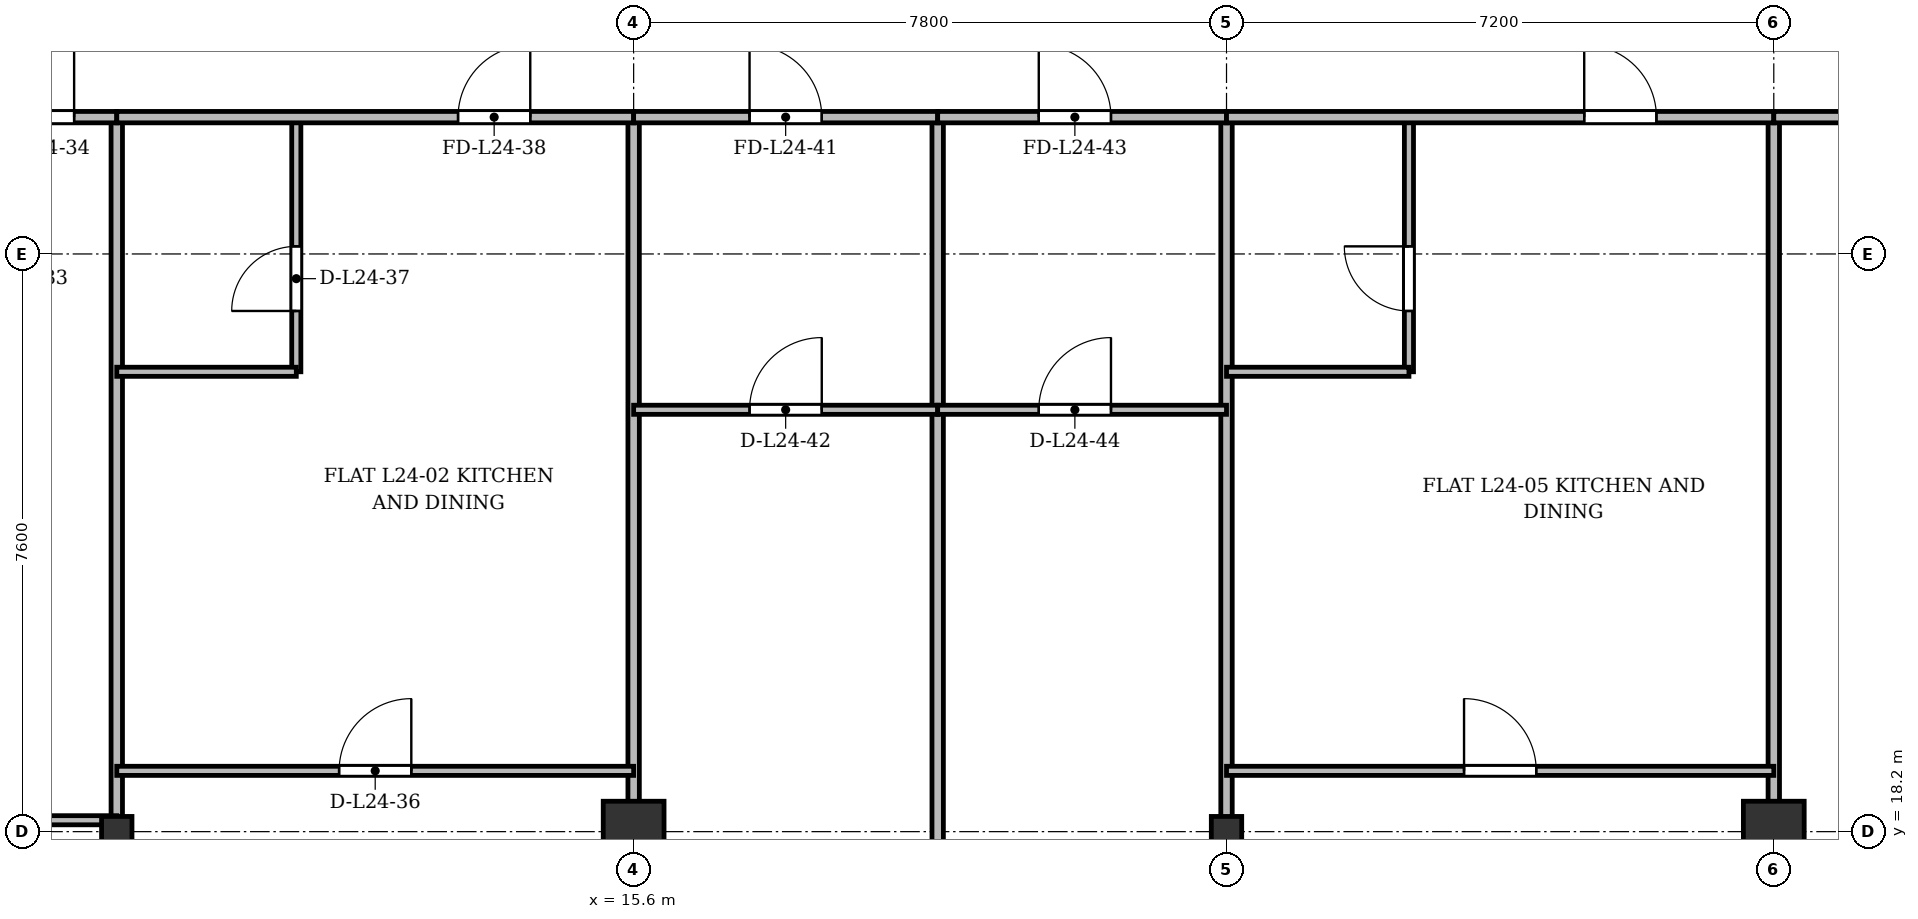
"""IFC4 building model, lengths in metres.
Left out: names, types, materials, properties, quantities, classifications, styles, units other than length and angle.
Written with IfcOpenShell. Run it as: python <this file> out.ifc"""

import sys

from ifc_helpers import new_model, si_unit, direction, frame, frame_2d, origin, origin_2d, place, context, subcontext, project, spatial, rectangle, i_section, extrude, source, transform, mapped, element, fill, save


model = new_model("IFC4")
c1 = context("Model", 3, precision=1e-05, world=origin(), true_north=direction((0.0, 1.0)))
c2 = subcontext(c1, "Body", "Model", "MODEL_VIEW")
j1 = project(units=[si_unit("LENGTHUNIT", "METRE"), si_unit("PLANEANGLEUNIT", "RADIAN")], contexts=[c1])
p1 = place(None, origin())
s1 = spatial("IfcSite", under=j1, at=p1, CompositionType="ELEMENT")
p2 = place(p1, origin())
s2 = spatial("IfcBuilding", under=s1, at=p2, CompositionType="ELEMENT")
p3 = place(p2, frame((0.0, 0.0, 96.1)))
s3 = spatial("IfcBuildingStorey", under=s2, at=p3, CompositionType="ELEMENT", Elevation=96.1)
m1 = source(origin(), c2, "Body", "SweptSolid", [
    extrude(i_section(OverallWidth=0.4, OverallDepth=0.4, WebThickness=0.022, FlangeThickness=0.035, at=origin_2d()), origin(), (0.0, 0.0, 1.0), 3.6),
])
p4 = place(p3, frame((8.8, 18.2, 0.0), z_axis=(0.0, 0.0, 1.0), x_axis=(1.0, 0.0, 0.0)))
e1 = element("IfcColumn", 1, at=p4, inside=s3, PredefinedType="COLUMN", context=c2, shape_type="MappedRepresentation", body=[
    mapped(m1, transform((0.0, 0.0, 0.0), x_axis=(1.0, 0.0, 0.0), y_axis=(0.0, 1.0, 0.0), z_axis=(0.0, 0.0, 1.0), scale=1.0)),
])
m2 = source(origin(), c2, "Body", "SweptSolid", [
    extrude(rectangle(XDim=0.8, YDim=0.8, at=origin_2d()), origin(), (0.0, 0.0, 1.0), 3.6),
])
p5 = place(p3, frame((15.6, 18.2, 0.0), z_axis=(0.0, 0.0, 1.0), x_axis=(1.0, 0.0, 0.0)))
e2 = element("IfcColumn", 2, at=p5, inside=s3, PredefinedType="COLUMN", context=c2, shape_type="MappedRepresentation", body=[
    mapped(m2, transform((0.0, 0.0, 0.0), x_axis=(1.0, 0.0, 0.0), y_axis=(0.0, 1.0, 0.0), z_axis=(0.0, 0.0, 1.0), scale=1.0)),
])
p6 = place(p3, frame((23.4, 18.2, 0.0), z_axis=(0.0, 0.0, 1.0), x_axis=(1.0, 0.0, 0.0)))
e3 = element("IfcColumn", 3, at=p6, inside=s3, PredefinedType="COLUMN", context=c2, shape_type="MappedRepresentation", body=[
    mapped(m1, transform((0.0, 0.0, 0.0), x_axis=(1.0, 0.0, 0.0), y_axis=(0.0, 1.0, 0.0), z_axis=(0.0, 0.0, 1.0), scale=1.0)),
])
p7 = place(p3, frame((30.6, 18.2, 0.0), z_axis=(0.0, 0.0, 1.0), x_axis=(1.0, 0.0, 0.0)))
e4 = element("IfcColumn", 4, at=p7, inside=s3, PredefinedType="COLUMN", context=c2, shape_type="MappedRepresentation", body=[
    mapped(m2, transform((0.0, 0.0, 0.0), x_axis=(1.0, 0.0, 0.0), y_axis=(0.0, 1.0, 0.0), z_axis=(0.0, 0.0, 1.0), scale=1.0)),
])
for number, where, z_axis, x_axis in (
    (5, (8.8, 3.145, 0.0), (0.0, 0.0, 1.0), (0.0, 1.0, 0.0)),
    (6, (15.6, 3.145, 0.0), (0.0, 0.0, 1.0), (0.0, 1.0, 0.0)),
):
    element("IfcWall", number, at=place(p3, frame(where, z_axis=z_axis, x_axis=x_axis)), inside=s3, PredefinedType="PARTITIONING", context=c2, shape_type="SweptSolid", body=[
        extrude(rectangle(XDim=24.455, YDim=0.15, at=frame_2d((12.228, 0.0))), origin(), (0.0, 0.0, 1.0), 2.84),
    ])
p8 = place(p3, frame((19.6, 3.145, 0.0), z_axis=(0.0, 0.0, 1.0), x_axis=(0.0, 1.0, 0.0)))
e7 = element("IfcWall", 7, at=p8, inside=s3, PredefinedType="PARTITIONING", context=c2, shape_type="SweptSolid", body=[
    extrude(rectangle(XDim=24.455, YDim=0.15, at=frame_2d((12.228, 0.0))), origin(), (0.0, 0.0, 1.0), 2.752),
])
for number, where, z_axis, x_axis in (
    (8, (23.4, 3.145, 0.0), (0.0, 0.0, 1.0), (0.0, 1.0, 0.0)),
    (9, (30.6, 3.145, 0.0), (0.0, 0.0, 1.0), (0.0, 1.0, 0.0)),
):
    element("IfcWall", number, at=place(p3, frame(where, z_axis=z_axis, x_axis=x_axis)), inside=s3, PredefinedType="PARTITIONING", context=c2, shape_type="SweptSolid", body=[
        extrude(rectangle(XDim=24.455, YDim=0.15, at=frame_2d((12.228, 0.0))), origin(), (0.0, 0.0, 1.0), 2.84),
    ])
p9 = place(p3, frame((4.76, 18.35, 0.0), z_axis=(0.0, 0.0, 1.0), x_axis=(1.0, 0.0, 0.0)))
e10 = element("IfcWall", 10, at=p9, inside=s3, PredefinedType="PARTITIONING", context=c2, shape_type="SweptSolid", body=[
    extrude(rectangle(XDim=4.04, YDim=0.12, at=frame_2d((2.02, 0.0))), origin(), (0.0, 0.0, 1.0), 2.752),
])
p10 = place(p9, frame((1.545, 0.0, 0.0)))
e11 = element("IfcOpeningElement", 11, at=p10, cuts=e10, PredefinedType="OPENING", context=c2, shape_type="SweptSolid", body=[
    extrude(rectangle(XDim=0.95, YDim=2.15, at=frame_2d((0.475, 1.075))), frame((0.0, 0.07, 0.0), z_axis=(0.0, -1.0, 0.0), x_axis=(1.0, 0.0, 0.0)), (0.0, 0.0, 1.0), 0.14),
])
p11 = place(p3, frame((4.745, 27.6, 0.0), z_axis=(0.0, 0.0, 1.0), x_axis=(1.0, 0.0, 0.0)))
e12 = element("IfcWall", 12, at=p11, inside=s3, PredefinedType="PARTITIONING", context=c2, shape_type="SweptSolid", body=[
    extrude(rectangle(XDim=4.055, YDim=0.15, at=frame_2d((2.027, 0.0))), origin(), (0.0, 0.0, 1.0), 2.84),
])
p12 = place(p11, frame((2.544, 0.0, 0.0)))
e13 = element("IfcOpeningElement", 13, at=p12, cuts=e12, PredefinedType="OPENING", context=c2, shape_type="SweptSolid", body=[
    extrude(rectangle(XDim=0.95, YDim=2.15, at=frame_2d((0.475, 1.075))), frame((0.0, 0.085, 0.0), z_axis=(0.0, -1.0, 0.0), x_axis=(1.0, 0.0, 0.0)), (0.0, 0.0, 1.0), 0.17),
])
p13 = place(p3, frame((8.8, 19.0, 0.0), z_axis=(0.0, 0.0, 1.0), x_axis=(1.0, 0.0, 0.0)))
e14 = element("IfcWall", 14, at=p13, inside=s3, PredefinedType="PARTITIONING", context=c2, shape_type="SweptSolid", body=[
    extrude(rectangle(XDim=6.8, YDim=0.12, at=frame_2d((3.4, 0.0))), origin(), (0.0, 0.0, 1.0), 2.84),
])
p14 = place(p13, frame((2.925, 0.0, 0.0)))
e15 = element("IfcOpeningElement", 15, at=p14, cuts=e14, PredefinedType="OPENING", context=c2, shape_type="SweptSolid", body=[
    extrude(rectangle(XDim=0.95, YDim=2.15, at=frame_2d((0.475, 1.075))), frame((0.0, 0.07, 0.0), z_axis=(0.0, -1.0, 0.0), x_axis=(1.0, 0.0, 0.0)), (0.0, 0.0, 1.0), 0.14),
])
p15 = place(p3, frame((11.162, 24.25, 0.0), z_axis=(0.0, 0.0, 1.0), x_axis=(0.0, 1.0, 0.0)))
e16 = element("IfcWall", 16, at=p15, inside=s3, PredefinedType="PARTITIONING", context=c2, shape_type="SweptSolid", body=[
    extrude(rectangle(XDim=3.35, YDim=0.12, at=frame_2d((1.675, 0.0))), origin(), (0.0, 0.0, 1.0), 2.99),
])
p16 = place(p15, frame((0.8, 0.0, 0.0)))
e17 = element("IfcOpeningElement", 17, at=p16, cuts=e16, PredefinedType="OPENING", context=c2, shape_type="SweptSolid", body=[
    extrude(rectangle(XDim=0.85, YDim=2.1, at=frame_2d((0.425, 1.05))), frame((0.0, 0.07, 0.0), z_axis=(0.0, -1.0, 0.0), x_axis=(1.0, 0.0, 0.0)), (0.0, 0.0, 1.0), 0.14),
])
p17 = place(p3, frame((8.8, 24.25, 0.0), z_axis=(0.0, 0.0, 1.0), x_axis=(1.0, 0.0, 0.0)))
e18 = element("IfcWall", 18, at=p17, inside=s3, PredefinedType="PARTITIONING", context=c2, shape_type="SweptSolid", body=[
    extrude(rectangle(XDim=2.362, YDim=0.12, at=frame_2d((1.181, 0.0))), origin(), (0.0, 0.0, 1.0), 2.84),
])
p18 = place(p3, frame((8.8, 27.6, 0.0), z_axis=(0.0, 0.0, 1.0), x_axis=(1.0, 0.0, 0.0)))
e19 = element("IfcWall", 19, at=p18, inside=s3, PredefinedType="PARTITIONING", context=c2, shape_type="SweptSolid", body=[
    extrude(rectangle(XDim=6.8, YDim=0.15, at=frame_2d((3.4, 0.0))), origin(), (0.0, 0.0, 1.0), 2.84),
])
p19 = place(p18, frame((4.49, 0.0, 0.0)))
e20 = element("IfcOpeningElement", 20, at=p19, cuts=e19, PredefinedType="OPENING", context=c2, shape_type="SweptSolid", body=[
    extrude(rectangle(XDim=0.95, YDim=2.15, at=frame_2d((0.475, 1.075))), frame((0.0, 0.085, 0.0), z_axis=(0.0, -1.0, 0.0), x_axis=(1.0, 0.0, 0.0)), (0.0, 0.0, 1.0), 0.17),
])
p20 = place(p3, frame((15.6, 27.6, 0.0), z_axis=(0.0, 0.0, 1.0), x_axis=(1.0, 0.0, 0.0)))
e21 = element("IfcWall", 21, at=p20, inside=s3, PredefinedType="PARTITIONING", context=c2, shape_type="SweptSolid", body=[
    extrude(rectangle(XDim=4.0, YDim=0.15, at=frame_2d((2.0, 0.0))), origin(), (0.0, 0.0, 1.0), 2.84),
])
p21 = place(p20, frame((1.525, 0.0, 0.0)))
e22 = element("IfcOpeningElement", 22, at=p21, cuts=e21, PredefinedType="OPENING", context=c2, shape_type="SweptSolid", body=[
    extrude(rectangle(XDim=0.95, YDim=2.15, at=frame_2d((0.475, 1.075))), frame((0.0, 0.085, 0.0), z_axis=(0.0, -1.0, 0.0), x_axis=(1.0, 0.0, 0.0)), (0.0, 0.0, 1.0), 0.17),
])
p22 = place(p3, frame((15.6, 23.75, 0.0), z_axis=(0.0, 0.0, 1.0), x_axis=(1.0, 0.0, 0.0)))
e23 = element("IfcWall", 23, at=p22, inside=s3, PredefinedType="PARTITIONING", context=c2, shape_type="SweptSolid", body=[
    extrude(rectangle(XDim=4.0, YDim=0.12, at=frame_2d((2.0, 0.0))), origin(), (0.0, 0.0, 1.0), 2.84),
])
p23 = place(p22, frame((1.525, 0.0, 0.0)))
e24 = element("IfcOpeningElement", 24, at=p23, cuts=e23, PredefinedType="OPENING", context=c2, shape_type="SweptSolid", body=[
    extrude(rectangle(XDim=0.95, YDim=2.15, at=frame_2d((0.475, 1.075))), frame((0.0, 0.07, 0.0), z_axis=(0.0, -1.0, 0.0), x_axis=(1.0, 0.0, 0.0)), (0.0, 0.0, 1.0), 0.14),
])
p24 = place(p3, frame((19.6, 27.6, 0.0), z_axis=(0.0, 0.0, 1.0), x_axis=(1.0, 0.0, 0.0)))
e25 = element("IfcWall", 25, at=p24, inside=s3, PredefinedType="PARTITIONING", context=c2, shape_type="SweptSolid", body=[
    extrude(rectangle(XDim=3.8, YDim=0.15, at=frame_2d((1.9, 0.0))), origin(), (0.0, 0.0, 1.0), 2.84),
])
p25 = place(p24, frame((1.33, 0.0, 0.0)))
e26 = element("IfcOpeningElement", 26, at=p25, cuts=e25, PredefinedType="OPENING", context=c2, shape_type="SweptSolid", body=[
    extrude(rectangle(XDim=0.95, YDim=2.15, at=frame_2d((0.475, 1.075))), frame((0.0, 0.085, 0.0), z_axis=(0.0, -1.0, 0.0), x_axis=(1.0, 0.0, 0.0)), (0.0, 0.0, 1.0), 0.17),
])
p26 = place(p3, frame((19.6, 23.75, 0.0), z_axis=(0.0, 0.0, 1.0), x_axis=(1.0, 0.0, 0.0)))
e27 = element("IfcWall", 27, at=p26, inside=s3, PredefinedType="PARTITIONING", context=c2, shape_type="SweptSolid", body=[
    extrude(rectangle(XDim=3.8, YDim=0.12, at=frame_2d((1.9, 0.0))), origin(), (0.0, 0.0, 1.0), 2.84),
])
p27 = place(p26, frame((1.33, 0.0, 0.0)))
e28 = element("IfcOpeningElement", 28, at=p27, cuts=e27, PredefinedType="OPENING", context=c2, shape_type="SweptSolid", body=[
    extrude(rectangle(XDim=0.95, YDim=2.15, at=frame_2d((0.475, 1.075))), frame((0.0, 0.07, 0.0), z_axis=(0.0, -1.0, 0.0), x_axis=(1.0, 0.0, 0.0)), (0.0, 0.0, 1.0), 0.14),
])
p28 = place(p3, frame((23.4, 19.0, 0.0), z_axis=(0.0, 0.0, 1.0), x_axis=(1.0, 0.0, 0.0)))
e29 = element("IfcWall", 29, at=p28, inside=s3, PredefinedType="PARTITIONING", context=c2, shape_type="SweptSolid", body=[
    extrude(rectangle(XDim=7.2, YDim=0.12, at=frame_2d((3.6, 0.0))), origin(), (0.0, 0.0, 1.0), 2.84),
])
p29 = place(p28, frame((3.125, 0.0, 0.0)))
e30 = element("IfcOpeningElement", 30, at=p29, cuts=e29, PredefinedType="OPENING", context=c2, shape_type="SweptSolid", body=[
    extrude(rectangle(XDim=0.95, YDim=2.15, at=frame_2d((0.475, 1.075))), frame((0.0, 0.07, 0.0), z_axis=(0.0, -1.0, 0.0), x_axis=(1.0, 0.0, 0.0)), (0.0, 0.0, 1.0), 0.14),
])
p30 = place(p3, frame((25.8, 24.25, 0.0), z_axis=(0.0, 0.0, 1.0), x_axis=(0.0, 1.0, 0.0)))
e31 = element("IfcWall", 31, at=p30, inside=s3, PredefinedType="PARTITIONING", context=c2, shape_type="SweptSolid", body=[
    extrude(rectangle(XDim=3.35, YDim=0.12, at=frame_2d((1.675, 0.0))), origin(), (0.0, 0.0, 1.0), 2.99),
])
p31 = place(p30, frame((0.8, 0.0, 0.0)))
e32 = element("IfcOpeningElement", 32, at=p31, cuts=e31, PredefinedType="OPENING", context=c2, shape_type="SweptSolid", body=[
    extrude(rectangle(XDim=0.85, YDim=2.1, at=frame_2d((0.425, 1.05))), frame((0.0, 0.07, 0.0), z_axis=(0.0, -1.0, 0.0), x_axis=(1.0, 0.0, 0.0)), (0.0, 0.0, 1.0), 0.14),
])
p32 = place(p3, frame((23.4, 24.25, 0.0), z_axis=(0.0, 0.0, 1.0), x_axis=(1.0, 0.0, 0.0)))
e33 = element("IfcWall", 33, at=p32, inside=s3, PredefinedType="PARTITIONING", context=c2, shape_type="SweptSolid", body=[
    extrude(rectangle(XDim=2.4, YDim=0.12, at=frame_2d((1.2, 0.0))), origin(), (0.0, 0.0, 1.0), 2.84),
])
p33 = place(p3, frame((23.4, 27.6, 0.0), z_axis=(0.0, 0.0, 1.0), x_axis=(1.0, 0.0, 0.0)))
e34 = element("IfcWall", 34, at=p33, inside=s3, PredefinedType="PARTITIONING", context=c2, shape_type="SweptSolid", body=[
    extrude(rectangle(XDim=7.2, YDim=0.15, at=frame_2d((3.6, 0.0))), origin(), (0.0, 0.0, 1.0), 2.84),
])
p34 = place(p33, frame((4.706, 0.0, 0.0)))
e35 = element("IfcOpeningElement", 35, at=p34, cuts=e34, PredefinedType="OPENING", context=c2, shape_type="SweptSolid", body=[
    extrude(rectangle(XDim=0.95, YDim=2.15, at=frame_2d((0.475, 1.075))), frame((0.0, 0.085, 0.0), z_axis=(0.0, -1.0, 0.0), x_axis=(1.0, 0.0, 0.0)), (0.0, 0.0, 1.0), 0.17),
])
p35 = place(p3, frame((30.6, 27.6, 0.0), z_axis=(0.0, 0.0, 1.0), x_axis=(1.0, 0.0, 0.0)))
e36 = element("IfcWall", 36, at=p35, inside=s3, PredefinedType="PARTITIONING", context=c2, shape_type="SweptSolid", body=[
    extrude(rectangle(XDim=13.2, YDim=0.15, at=frame_2d((6.6, 0.0))), origin(), (0.0, 0.0, 1.0), 2.84),
])
p36 = place(p35, frame((5.8, 0.0, 0.0)))
e37 = element("IfcOpeningElement", 37, at=p36, cuts=e36, PredefinedType="OPENING", context=c2, shape_type="SweptSolid", body=[
    extrude(rectangle(XDim=1.6, YDim=2.2, at=frame_2d((0.8, 1.1))), frame((0.0, 0.085, 0.0), z_axis=(0.0, -1.0, 0.0), x_axis=(1.0, 0.0, 0.0)), (0.0, 0.0, 1.0), 0.17),
])
m3 = source(origin(), c2, "Body", "SweptSolid", [
    extrude(rectangle(XDim=0.95, YDim=2.15, at=frame_2d((0.475, 1.075))), frame((0.0, 0.025, 0.0), z_axis=(0.0, -1.0, 0.0), x_axis=(1.0, 0.0, 0.0)), (0.0, 0.0, 1.0), 0.05),
])
p37 = place(p12, origin())
e38 = element("IfcDoor", 38, at=p37, inside=s3, OperationType="SINGLE_SWING_RIGHT", PredefinedType="DOOR", context=c2, shape_type="MappedRepresentation", body=[
    mapped(m3, transform((0.0, 0.0, 0.0), x_axis=(1.0, 0.0, 0.0), y_axis=(0.0, 1.0, 0.0), z_axis=(0.0, 0.0, 1.0), scale=1.0)),
])
fill(e13, e38)
p38 = place(p14, origin())
e39 = element("IfcDoor", 39, at=p38, inside=s3, OperationType="SINGLE_SWING_RIGHT", PredefinedType="DOOR", context=c2, shape_type="MappedRepresentation", body=[
    mapped(m3, transform((0.0, 0.0, 0.0), x_axis=(1.0, 0.0, 0.0), y_axis=(0.0, 1.0, 0.0), z_axis=(0.0, 0.0, 1.0), scale=1.0)),
])
fill(e15, e39)
m4 = source(origin(), c2, "Body", "SweptSolid", [
    extrude(rectangle(XDim=0.85, YDim=2.1, at=frame_2d((0.425, 1.05))), frame((0.0, 0.025, 0.0), z_axis=(0.0, -1.0, 0.0), x_axis=(1.0, 0.0, 0.0)), (0.0, 0.0, 1.0), 0.05),
])
p39 = place(p16, origin())
e40 = element("IfcDoor", 40, at=p39, inside=s3, OperationType="SINGLE_SWING_LEFT", PredefinedType="DOOR", context=c2, shape_type="MappedRepresentation", body=[
    mapped(m4, transform((0.0, 0.0, 0.0), x_axis=(1.0, 0.0, 0.0), y_axis=(0.0, 1.0, 0.0), z_axis=(0.0, 0.0, 1.0), scale=1.0)),
])
fill(e17, e40)
p40 = place(p19, origin())
e41 = element("IfcDoor", 41, at=p40, inside=s3, OperationType="SINGLE_SWING_RIGHT", PredefinedType="DOOR", context=c2, shape_type="MappedRepresentation", body=[
    mapped(m3, transform((0.0, 0.0, 0.0), x_axis=(1.0, 0.0, 0.0), y_axis=(0.0, 1.0, 0.0), z_axis=(0.0, 0.0, 1.0), scale=1.0)),
])
fill(e20, e41)
p41 = place(p21, origin())
e42 = element("IfcDoor", 42, at=p41, inside=s3, OperationType="SINGLE_SWING_LEFT", PredefinedType="DOOR", context=c2, shape_type="MappedRepresentation", body=[
    mapped(m3, transform((0.0, 0.0, 0.0), x_axis=(1.0, 0.0, 0.0), y_axis=(0.0, 1.0, 0.0), z_axis=(0.0, 0.0, 1.0), scale=1.0)),
])
fill(e22, e42)
p42 = place(p23, origin())
e43 = element("IfcDoor", 43, at=p42, inside=s3, OperationType="SINGLE_SWING_RIGHT", PredefinedType="DOOR", context=c2, shape_type="MappedRepresentation", body=[
    mapped(m3, transform((0.0, 0.0, 0.0), x_axis=(1.0, 0.0, 0.0), y_axis=(0.0, 1.0, 0.0), z_axis=(0.0, 0.0, 1.0), scale=1.0)),
])
fill(e24, e43)
p43 = place(p25, origin())
e44 = element("IfcDoor", 44, at=p43, inside=s3, OperationType="SINGLE_SWING_LEFT", PredefinedType="DOOR", context=c2, shape_type="MappedRepresentation", body=[
    mapped(m3, transform((0.0, 0.0, 0.0), x_axis=(1.0, 0.0, 0.0), y_axis=(0.0, 1.0, 0.0), z_axis=(0.0, 0.0, 1.0), scale=1.0)),
])
fill(e26, e44)
p44 = place(p27, origin())
e45 = element("IfcDoor", 45, at=p44, inside=s3, OperationType="SINGLE_SWING_RIGHT", PredefinedType="DOOR", context=c2, shape_type="MappedRepresentation", body=[
    mapped(m3, transform((0.0, 0.0, 0.0), x_axis=(1.0, 0.0, 0.0), y_axis=(0.0, 1.0, 0.0), z_axis=(0.0, 0.0, 1.0), scale=1.0)),
])
fill(e28, e45)
p45 = place(p29, origin())
e46 = element("IfcDoor", 46, at=p45, inside=s3, OperationType="SINGLE_SWING_LEFT", PredefinedType="DOOR", context=c2, shape_type="MappedRepresentation", body=[
    mapped(m3, transform((0.0, 0.0, 0.0), x_axis=(1.0, 0.0, 0.0), y_axis=(0.0, 1.0, 0.0), z_axis=(0.0, 0.0, 1.0), scale=1.0)),
])
fill(e30, e46)
p46 = place(p31, origin())
e47 = element("IfcDoor", 47, at=p46, inside=s3, OperationType="SINGLE_SWING_RIGHT", PredefinedType="DOOR", context=c2, shape_type="MappedRepresentation", body=[
    mapped(m4, transform((0.0, 0.0, 0.0), x_axis=(1.0, 0.0, 0.0), y_axis=(0.0, 1.0, 0.0), z_axis=(0.0, 0.0, 1.0), scale=1.0)),
])
fill(e32, e47)
p47 = place(p34, origin())
e48 = element("IfcDoor", 48, at=p47, inside=s3, OperationType="SINGLE_SWING_LEFT", PredefinedType="DOOR", context=c2, shape_type="MappedRepresentation", body=[
    mapped(m3, transform((0.0, 0.0, 0.0), x_axis=(1.0, 0.0, 0.0), y_axis=(0.0, 1.0, 0.0), z_axis=(0.0, 0.0, 1.0), scale=1.0)),
])
fill(e35, e48)
save(model, sys.argv[1])
